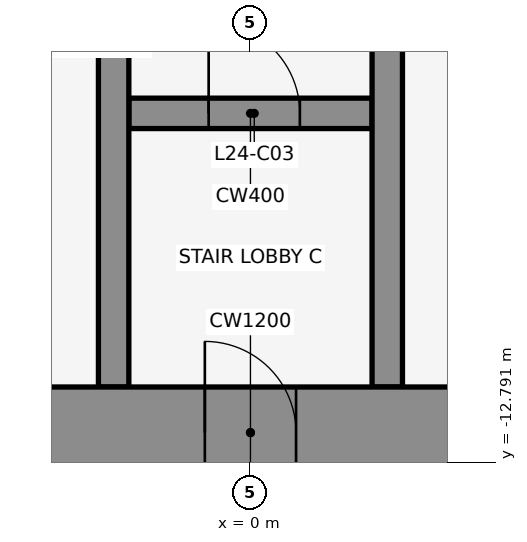
"""IFC4 building model, lengths in metres.
Left out: names, types, materials, properties, quantities, classifications, styles, units other than length and angle.
Written with IfcOpenShell. Run it as: python <this file> out.ifc"""

import sys

from ifc_helpers import new_model, si_unit, direction, frame, frame_2d, origin, place, context, subcontext, project, spatial, rectangle, extrude, element, fill, save


model = new_model("IFC4")
c1 = context("Model", 3, precision=1e-05, world=origin(), true_north=direction((0.0, 1.0)))
c2 = subcontext(c1, "Body", "Model", "MODEL_VIEW")
j1 = project(units=[si_unit("LENGTHUNIT", "METRE"), si_unit("PLANEANGLEUNIT", "RADIAN")], contexts=[c1])
p1 = place(None, origin())
s1 = spatial("IfcSite", under=j1, at=p1, CompositionType="ELEMENT")
p2 = place(p1, origin())
s2 = spatial("IfcBuilding", under=s1, at=p2, CompositionType="ELEMENT")
p3 = place(p2, frame((0.0, 0.0, 114.5)))
s3 = spatial("IfcBuildingStorey", under=s2, at=p3, CompositionType="ELEMENT", Elevation=114.5)
p4 = place(p3, frame((-1.6, -8.2, 0.0), z_axis=(0.0, 0.0, 1.0), x_axis=(1.0, 0.0, 0.0)))
e1 = element("IfcWall", 1, at=p4, inside=s3, PredefinedType="SHEAR", context=c2, shape_type="SweptSolid", body=[
    extrude(rectangle(XDim=3.2, YDim=0.4, at=frame_2d((1.6, 0.0))), origin(), (0.0, 0.0, 1.0), 4.1),
])
p5 = place(p4, frame((1.05, 0.0, 0.0)))
e2 = element("IfcOpeningElement", 2, at=p5, cuts=e1, PredefinedType="OPENING", context=c2, shape_type="SweptSolid", body=[
    extrude(rectangle(XDim=1.2, YDim=2.1, at=frame_2d((0.6, 1.05))), frame((0.0, 0.212, 0.0), z_axis=(0.0, -1.0, 0.0), x_axis=(1.0, 0.0, 0.0)), (0.0, 0.0, 1.0), 0.424),
])
for number, where, z_axis, x_axis in (
    (3, (-1.8, -11.8, 0.0), (0.0, 0.0, 1.0), (0.0, 1.0, 0.0)),
    (4, (1.8, -11.8, 0.0), (0.0, 0.0, 1.0), (0.0, 1.0, 0.0)),
):
    element("IfcWall", number, at=place(p3, frame(where, z_axis=z_axis, x_axis=x_axis)), inside=s3, PredefinedType="SHEAR", context=c2, shape_type="SweptSolid", body=[
        extrude(rectangle(XDim=10.6, YDim=0.4, at=frame_2d((5.3, 0.0))), origin(), (0.0, 0.0, 1.0), 4.1),
    ])
p6 = place(p3, frame((-22.0, -12.4, 0.0), z_axis=(0.0, 0.0, 1.0), x_axis=(1.0, 0.0, 0.0)))
e5 = element("IfcWall", 5, at=p6, inside=s3, PredefinedType="SHEAR", context=c2, shape_type="SweptSolid", body=[
    extrude(rectangle(XDim=44.0, YDim=1.2, at=frame_2d((22.0, 0.0))), origin(), (0.0, 0.0, 1.0), 4.1),
])
p7 = place(p6, frame((2.2, 0.0, 0.0)))
e6 = element("IfcOpeningElement", 6, at=p7, cuts=e5, PredefinedType="OPENING", context=c2, shape_type="SweptSolid", body=[
    extrude(rectangle(XDim=1.2, YDim=2.1, at=frame_2d((0.6, 1.05))), frame((0.0, 0.612, 0.0), z_axis=(0.0, -1.0, 0.0), x_axis=(1.0, 0.0, 0.0)), (0.0, 0.0, 1.0), 1.224),
])
p8 = place(p6, frame((21.4, 0.0, 0.0)))
e7 = element("IfcOpeningElement", 7, at=p8, cuts=e5, PredefinedType="OPENING", context=c2, shape_type="SweptSolid", body=[
    extrude(rectangle(XDim=1.2, YDim=2.1, at=frame_2d((0.6, 1.05))), frame((0.0, 0.612, 0.0), z_axis=(0.0, -1.0, 0.0), x_axis=(1.0, 0.0, 0.0)), (0.0, 0.0, 1.0), 1.224),
])
p9 = place(p6, frame((40.6, 0.0, 0.0)))
e8 = element("IfcOpeningElement", 8, at=p9, cuts=e5, PredefinedType="OPENING", context=c2, shape_type="SweptSolid", body=[
    extrude(rectangle(XDim=1.2, YDim=2.1, at=frame_2d((0.6, 1.05))), frame((0.0, 0.612, 0.0), z_axis=(0.0, -1.0, 0.0), x_axis=(1.0, 0.0, 0.0)), (0.0, 0.0, 1.0), 1.224),
])
p10 = place(p6, frame((16.0, 0.0, 0.0)))
e9 = element("IfcOpeningElement", 9, at=p10, cuts=e5, PredefinedType="OPENING", context=c2, shape_type="SweptSolid", body=[
    extrude(rectangle(XDim=1.8, YDim=2.1, at=frame_2d((0.9, 1.05))), frame((0.0, 0.612, 0.0), z_axis=(0.0, -1.0, 0.0), x_axis=(1.0, 0.0, 0.0)), (0.0, 0.0, 1.0), 1.224),
])
p11 = place(p6, frame((6.3, 0.0, 0.0)))
e10 = element("IfcOpeningElement", 10, at=p11, cuts=e5, PredefinedType="OPENING", context=c2, shape_type="SweptSolid", body=[
    extrude(rectangle(XDim=1.2, YDim=2.1, at=frame_2d((0.6, 1.05))), frame((0.0, 0.612, 0.0), z_axis=(0.0, -1.0, 0.0), x_axis=(1.0, 0.0, 0.0)), (0.0, 0.0, 1.0), 1.224),
])
p12 = place(p6, frame((26.2, 0.0, 0.0)))
e11 = element("IfcOpeningElement", 11, at=p12, cuts=e5, PredefinedType="OPENING", context=c2, shape_type="SweptSolid", body=[
    extrude(rectangle(XDim=1.8, YDim=2.1, at=frame_2d((0.9, 1.05))), frame((0.0, 0.612, 0.0), z_axis=(0.0, -1.0, 0.0), x_axis=(1.0, 0.0, 0.0)), (0.0, 0.0, 1.0), 1.224),
])
p13 = place(p6, frame((36.5, 0.0, 0.0)))
e12 = element("IfcOpeningElement", 12, at=p13, cuts=e5, PredefinedType="OPENING", context=c2, shape_type="SweptSolid", body=[
    extrude(rectangle(XDim=1.2, YDim=2.1, at=frame_2d((0.6, 1.05))), frame((0.0, 0.612, 0.0), z_axis=(0.0, -1.0, 0.0), x_axis=(1.0, 0.0, 0.0)), (0.0, 0.0, 1.0), 1.224),
])
p14 = place(p5, origin())
e13 = element("IfcDoor", 13, at=p14, inside=s3, OperationType="SINGLE_SWING_LEFT", PredefinedType="DOOR", context=c2, shape_type="SweptSolid", body=[
    extrude(rectangle(XDim=1.2, YDim=2.1, at=frame_2d((0.6, 1.05))), frame((0.0, 0.025, 0.0), z_axis=(0.0, -1.0, 0.0), x_axis=(1.0, 0.0, 0.0)), (0.0, 0.0, 1.0), 0.05),
])
fill(e2, e13)
p15 = place(p8, frame((1.2, 0.0, 0.0), z_axis=(0.0, 0.0, 1.0), x_axis=(-1.0, 0.0, 0.0)))
e14 = element("IfcDoor", 14, at=p15, inside=s3, OperationType="SINGLE_SWING_RIGHT", PredefinedType="DOOR", context=c2, shape_type="SweptSolid", body=[
    extrude(rectangle(XDim=1.2, YDim=2.1, at=frame_2d((0.6, 1.05))), frame((0.0, 0.025, 0.0), z_axis=(0.0, -1.0, 0.0), x_axis=(1.0, 0.0, 0.0)), (0.0, 0.0, 1.0), 0.05),
])
fill(e7, e14)
save(model, sys.argv[1])
